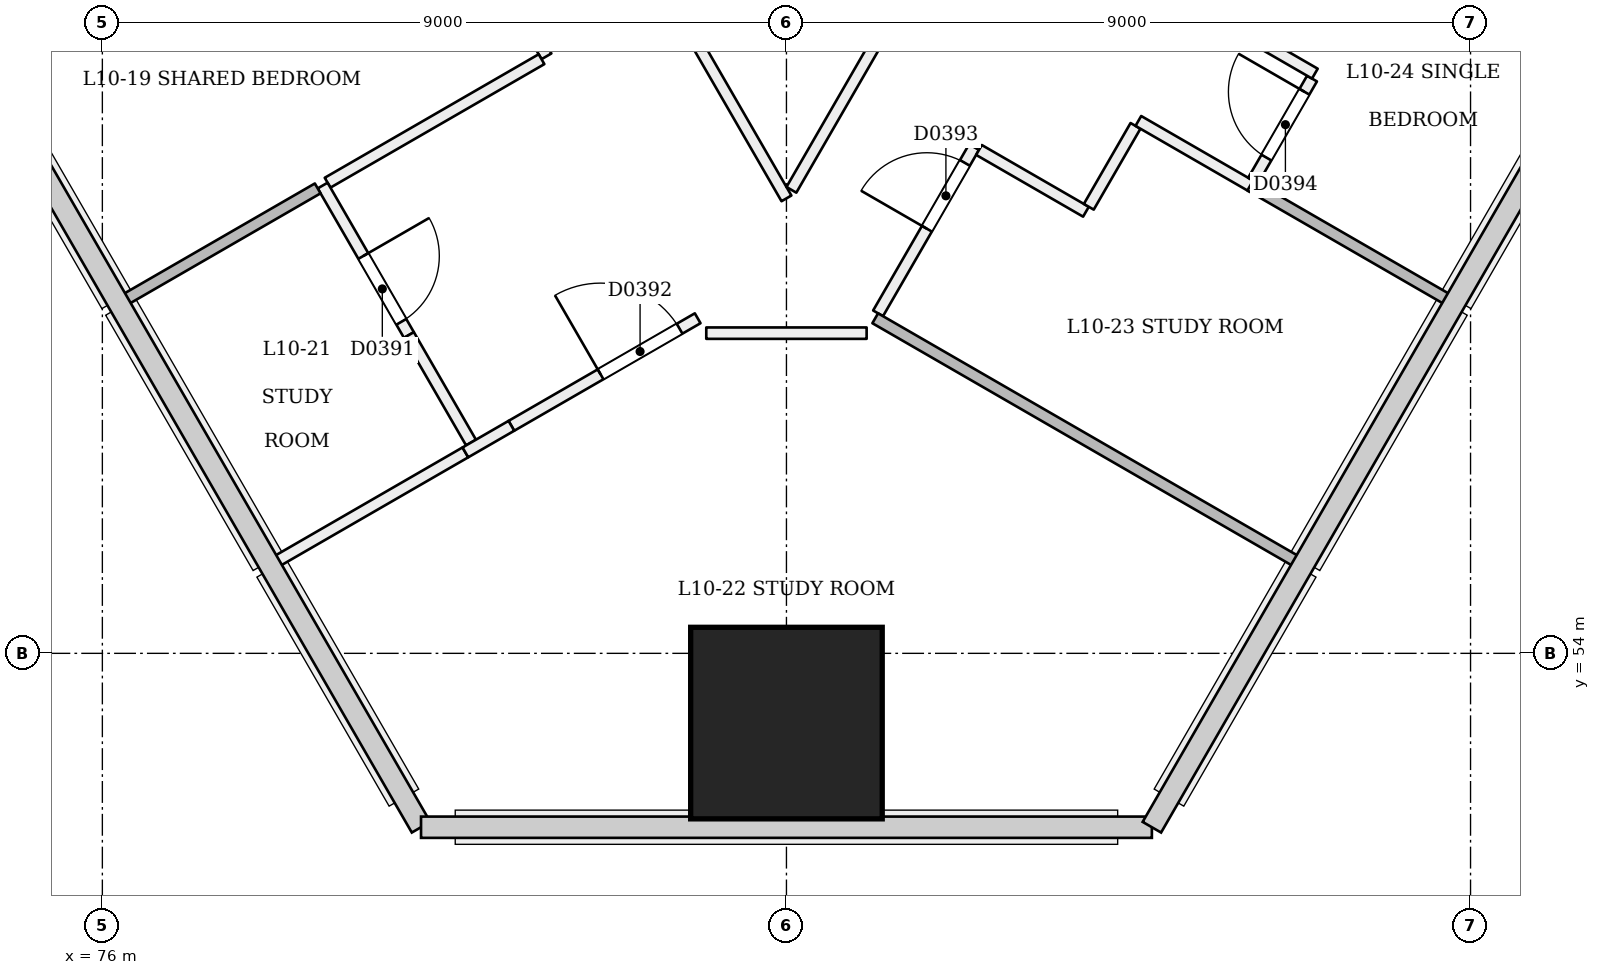
"""IFC4 building model, lengths in metres.
Left out: names, types, materials, properties, quantities, classifications, styles, units other than length and angle.
Written with IfcOpenShell. Run it as: python <this file> out.ifc"""

import sys

from ifc_helpers import new_model, si_unit, direction, frame, frame_2d, origin, origin_2d, place, context, subcontext, project, spatial, rectangle, extrude, element, fill, save


model = new_model("IFC4")
c1 = context("Model", 3, precision=1e-05, world=origin(), true_north=direction((0.0, 1.0)))
c2 = subcontext(c1, "Body", "Model", "MODEL_VIEW")
j1 = project(units=[si_unit("LENGTHUNIT", "METRE"), si_unit("PLANEANGLEUNIT", "RADIAN")], contexts=[c1])
p1 = place(None, origin())
s1 = spatial("IfcSite", under=j1, at=p1, CompositionType="ELEMENT")
p2 = place(p1, origin())
s2 = spatial("IfcBuilding", under=s1, at=p2, CompositionType="ELEMENT")
p3 = place(p2, frame((0.0, 0.0, 45.0)))
s3 = spatial("IfcBuildingStorey", under=s2, at=p3, CompositionType="ELEMENT", Elevation=45.0)
p4 = place(p3, frame((85.0, 53.012, 0.0), z_axis=(0.0, 0.058356907999, 0.998295783467), x_axis=(-1.0, 0.0, 0.0)))
e1 = element("IfcColumn", 1, at=p4, inside=s3, PredefinedType="COLUMN", context=c2, shape_type="SweptSolid", body=[
    extrude(rectangle(XDim=2.52, YDim=2.52, at=origin_2d()), origin(), (0.0, 0.0, 1.0), 3.606),
])
p5 = place(p3, frame((61.853, 96.477, 0.0), z_axis=(0.0, 0.0, 1.0), x_axis=(0.500000327816, -0.86602521452, 0.0)))
e2 = element("IfcWall", 2, at=p5, inside=s3, PredefinedType="PARTITIONING", context=c2, shape_type="SweptSolid", body=[
    extrude(rectangle(XDim=39.979, YDim=0.15, at=frame_2d((19.99, 0.0))), origin(), (0.0, 0.0, 1.0), 2.7),
])
p6 = place(p5, frame((1.49, 0.0, 0.0)))
e3 = element("IfcOpeningElement", 3, at=p6, cuts=e2, PredefinedType="OPENING", context=c2, shape_type="SweptSolid", body=[
    extrude(rectangle(XDim=1.0, YDim=2.1, at=frame_2d((0.5, 1.05))), frame((0.0, 0.085, 0.0), z_axis=(0.0, -1.0, 0.0), x_axis=(1.0, 0.0, 0.0)), (0.0, 0.0, 1.0), 0.171),
])
p7 = place(p5, frame((4.55, 0.0, 0.0)))
e4 = element("IfcOpeningElement", 4, at=p7, cuts=e2, PredefinedType="OPENING", context=c2, shape_type="SweptSolid", body=[
    extrude(rectangle(XDim=1.1, YDim=2.1, at=frame_2d((0.55, 1.05))), frame((0.0, 0.085, 0.0), z_axis=(0.0, -1.0, 0.0), x_axis=(1.0, 0.0, 0.0)), (0.0, 0.0, 1.0), 0.171),
])
p8 = place(p5, frame((11.259, 0.0, 0.0)))
e5 = element("IfcOpeningElement", 5, at=p8, cuts=e2, PredefinedType="OPENING", context=c2, shape_type="SweptSolid", body=[
    extrude(rectangle(XDim=1.0, YDim=2.1, at=frame_2d((0.5, 1.05))), frame((0.0, 0.085, 0.0), z_axis=(0.0, -1.0, 0.0), x_axis=(1.0, 0.0, 0.0)), (0.0, 0.0, 1.0), 0.171),
])
p9 = place(p5, frame((17.979, 0.0, 0.0)))
e6 = element("IfcOpeningElement", 6, at=p9, cuts=e2, PredefinedType="OPENING", context=c2, shape_type="SweptSolid", body=[
    extrude(rectangle(XDim=1.2, YDim=2.1, at=frame_2d((0.6, 1.05))), frame((0.0, 0.085, 0.0), z_axis=(0.0, -1.0, 0.0), x_axis=(1.0, 0.0, 0.0)), (0.0, 0.0, 1.0), 0.171),
])
p10 = place(p5, frame((22.699, 0.0, 0.0)))
e7 = element("IfcOpeningElement", 7, at=p10, cuts=e2, PredefinedType="OPENING", context=c2, shape_type="SweptSolid", body=[
    extrude(rectangle(XDim=1.0, YDim=2.1, at=frame_2d((0.5, 1.05))), frame((0.0, 0.085, 0.0), z_axis=(0.0, -1.0, 0.0), x_axis=(1.0, 0.0, 0.0)), (0.0, 0.0, 1.0), 0.171),
])
p11 = place(p5, frame((29.374, 0.0, 0.0)))
e8 = element("IfcOpeningElement", 8, at=p11, cuts=e2, PredefinedType="OPENING", context=c2, shape_type="SweptSolid", body=[
    extrude(rectangle(XDim=1.0, YDim=2.1, at=frame_2d((0.5, 1.05))), frame((0.0, 0.085, 0.0), z_axis=(0.0, -1.0, 0.0), x_axis=(1.0, 0.0, 0.0)), (0.0, 0.0, 1.0), 0.171),
])
p12 = place(p5, frame((31.584, 0.0, 0.0)))
e9 = element("IfcOpeningElement", 9, at=p12, cuts=e2, PredefinedType="OPENING", context=c2, shape_type="SweptSolid", body=[
    extrude(rectangle(XDim=1.0, YDim=2.1, at=frame_2d((0.5, 1.05))), frame((0.0, 0.085, 0.0), z_axis=(0.0, -1.0, 0.0), x_axis=(1.0, 0.0, 0.0)), (0.0, 0.0, 1.0), 0.171),
])
p13 = place(p5, frame((38.374, 0.0, 0.0)))
e10 = element("IfcOpeningElement", 10, at=p13, cuts=e2, PredefinedType="OPENING", context=c2, shape_type="SweptSolid", body=[
    extrude(rectangle(XDim=1.0, YDim=2.1, at=frame_2d((0.5, 1.05))), frame((0.0, 0.085, 0.0), z_axis=(0.0, -1.0, 0.0), x_axis=(1.0, 0.0, 0.0)), (0.0, 0.0, 1.0), 0.171),
])
p14 = place(p3, frame((81.778, 61.817, 0.0), z_axis=(0.0, 0.0, 1.0), x_axis=(-0.866015446554, -0.500017246033, 0.0)))
e11 = element("IfcWall", 11, at=p14, inside=s3, PredefinedType="PARTITIONING", context=c2, shape_type="SweptSolid", body=[
    extrude(rectangle(XDim=3.25, YDim=0.15, at=frame_2d((1.625, 0.0))), origin(), (0.0, 0.0, 1.0), 3.1),
])
p15 = place(p3, frame((78.898, 60.154, 0.0), z_axis=(0.0, 0.0, 1.0), x_axis=(0.499921036309, -0.866070988693, 0.0)))
e12 = element("IfcWall", 12, at=p15, inside=s3, PredefinedType="PARTITIONING", context=c2, shape_type="SweptSolid", body=[
    extrude(rectangle(XDim=2.27, YDim=0.15, at=frame_2d((1.135, 0.0))), origin(), (0.0, 0.0, 1.0), 3.1),
])
p16 = place(p15, frame((1.07, 0.0, 0.0)))
e13 = element("IfcOpeningElement", 13, at=p16, cuts=e12, PredefinedType="OPENING", context=c2, shape_type="SweptSolid", body=[
    extrude(rectangle(XDim=1.0, YDim=2.1, at=frame_2d((0.5, 1.05))), frame((0.0, 0.085, 0.0), z_axis=(0.0, -1.0, 0.0), x_axis=(1.0, 0.0, 0.0)), (0.0, 0.0, 1.0), 0.171),
])
p17 = place(p3, frame((80.033, 58.188, 0.0), z_axis=(0.0, 0.0, 1.0), x_axis=(0.500093320734, -0.865971518329, 0.0)))
e14 = element("IfcWall", 14, at=p17, inside=s3, PredefinedType="PARTITIONING", context=c2, shape_type="SweptSolid", body=[
    extrude(rectangle(XDim=1.634, YDim=0.15, at=frame_2d((0.817, 0.0))), origin(), (0.0, 0.0, 1.0), 2.6),
])
p18 = place(p3, frame((81.381, 56.993, 0.0), z_axis=(0.0, 0.0, 1.0), x_axis=(0.866004557827, 0.500036104519, 0.0)))
e15 = element("IfcWall", 15, at=p18, inside=s3, PredefinedType="PARTITIONING", context=c2, shape_type="SweptSolid", body=[
    extrude(rectangle(XDim=2.83, YDim=0.15, at=frame_2d((1.415, 0.0))), origin(), (0.0, 0.0, 1.0), 3.1),
])
p19 = place(p18, frame((1.355, 0.0, 0.0)))
e16 = element("IfcOpeningElement", 16, at=p19, cuts=e15, PredefinedType="OPENING", context=c2, shape_type="SweptSolid", body=[
    extrude(rectangle(XDim=1.2, YDim=2.1, at=frame_2d((0.6, 1.05))), frame((0.0, 0.085, 0.0), z_axis=(0.0, -1.0, 0.0), x_axis=(1.0, 0.0, 0.0)), (0.0, 0.0, 1.0), 0.171),
])
p20 = place(p3, frame((83.945, 58.212, 0.0), z_axis=(0.0, 0.0, 1.0), x_axis=(1.0, 0.0, 0.0)))
e17 = element("IfcWall", 17, at=p20, inside=s3, PredefinedType="PARTITIONING", context=c2, shape_type="SweptSolid", body=[
    extrude(rectangle(XDim=2.109, YDim=0.15, at=frame_2d((1.055, 0.0))), origin(), (0.0, 0.0, 1.0), 3.1),
])
p21 = place(p3, frame((86.205, 58.473, 0.0), z_axis=(0.0, 0.0, 1.0), x_axis=(0.500090717682, 0.865973021571, 0.0)))
e18 = element("IfcWall", 18, at=p21, inside=s3, PredefinedType="PARTITIONING", context=c2, shape_type="SweptSolid", body=[
    extrude(rectangle(XDim=2.525, YDim=0.15, at=frame_2d((1.262, 0.0))), origin(), (0.0, 0.0, 1.0), 3.1),
])
p22 = place(p21, frame((1.285, 0.0, 0.0)))
e19 = element("IfcOpeningElement", 19, at=p22, cuts=e18, PredefinedType="OPENING", context=c2, shape_type="SweptSolid", body=[
    extrude(rectangle(XDim=1.0, YDim=2.1, at=frame_2d((0.5, 1.05))), frame((0.0, 0.085, 0.0), z_axis=(0.0, -1.0, 0.0), x_axis=(1.0, 0.0, 0.0)), (0.0, 0.0, 1.0), 0.171),
])
p23 = place(p3, frame((87.533, 60.623, 0.0), z_axis=(0.0, 0.0, 1.0), x_axis=(0.866015446554, -0.500017246033, 0.0)))
e20 = element("IfcWall", 20, at=p23, inside=s3, PredefinedType="PARTITIONING", context=c2, shape_type="SweptSolid", body=[
    extrude(rectangle(XDim=1.625, YDim=0.15, at=frame_2d((0.812, 0.0))), origin(), (0.0, 0.0, 1.0), 3.1),
])
p24 = place(p3, frame((88.978, 59.875, 0.0), z_axis=(0.0, 0.0, 1.0), x_axis=(0.500049196018, 0.865996998587, 0.0)))
e21 = element("IfcWall", 21, at=p24, inside=s3, PredefinedType="PARTITIONING", context=c2, shape_type="SweptSolid", body=[
    extrude(rectangle(XDim=1.229, YDim=0.15, at=frame_2d((0.615, 0.0))), origin(), (0.0, 0.0, 1.0), 3.1),
])
p25 = place(p3, frame((89.63, 61.004, 0.0), z_axis=(0.0, 0.0, 1.0), x_axis=(0.866050849587, -0.499955923987, 0.0)))
e22 = element("IfcWall", 22, at=p25, inside=s3, PredefinedType="PARTITIONING", context=c2, shape_type="SweptSolid", body=[
    extrude(rectangle(XDim=1.72, YDim=0.15, at=frame_2d((0.86, 0.0))), origin(), (0.0, 0.0, 1.0), 3.1),
])
p26 = place(p3, frame((91.139, 60.219, 0.0), z_axis=(0.0, 0.0, 1.0), x_axis=(0.499967891604, 0.866043940782, 0.0)))
e23 = element("IfcWall", 23, at=p26, inside=s3, PredefinedType="PARTITIONING", context=c2, shape_type="SweptSolid", body=[
    extrude(rectangle(XDim=1.55, YDim=0.15, at=frame_2d((0.775, 0.0))), origin(), (0.0, 0.0, 1.0), 3.1),
])
p27 = place(p26, frame((0.35, 0.0, 0.0)))
e24 = element("IfcOpeningElement", 24, at=p27, cuts=e23, PredefinedType="OPENING", context=c2, shape_type="SweptSolid", body=[
    extrude(rectangle(XDim=1.0, YDim=2.1, at=frame_2d((0.5, 1.05))), frame((0.0, 0.085, 0.0), z_axis=(0.0, -1.0, 0.0), x_axis=(1.0, 0.0, 0.0)), (0.0, 0.0, 1.0), 0.171),
])
p28 = place(p3, frame((91.952, 61.626, 0.0), z_axis=(0.0, 0.0, 1.0), x_axis=(-0.865989465428, 0.500062241894, 0.0)))
e25 = element("IfcWall", 25, at=p28, inside=s3, PredefinedType="PARTITIONING", context=c2, shape_type="SweptSolid", body=[
    extrude(rectangle(XDim=1.7, YDim=0.15, at=frame_2d((0.85, 0.0))), origin(), (0.0, 0.0, 1.0), 3.1),
])
p29 = place(p3, frame((85.0, 59.985, 0.0), z_axis=(0.0, 0.0, 1.0), x_axis=(-0.499997052475, 0.866027105532, 0.0)))
e26 = element("IfcWall", 26, at=p29, inside=s3, PredefinedType="PARTITIONING", context=c2, shape_type="SweptSolid", body=[
    extrude(rectangle(XDim=35.351, YDim=0.15, at=frame_2d((17.675, 0.0))), origin(), (0.0, 0.0, 1.0), 3.1),
])
p30 = place(p29, frame((18.895, 0.0, 0.0)))
e27 = element("IfcOpeningElement", 27, at=p30, cuts=e26, PredefinedType="OPENING", context=c2, shape_type="SweptSolid", body=[
    extrude(rectangle(XDim=1.2, YDim=2.1, at=frame_2d((0.6, 1.05))), frame((0.0, 0.085, 0.0), z_axis=(0.0, -1.0, 0.0), x_axis=(1.0, 0.0, 0.0)), (0.0, 0.0, 1.0), 0.171),
])
p31 = place(p29, frame((24.135, 0.0, 0.0)))
e28 = element("IfcOpeningElement", 28, at=p31, cuts=e26, PredefinedType="OPENING", context=c2, shape_type="SweptSolid", body=[
    extrude(rectangle(XDim=1.2, YDim=2.1, at=frame_2d((0.6, 1.05))), frame((0.0, 0.085, 0.0), z_axis=(0.0, -1.0, 0.0), x_axis=(1.0, 0.0, 0.0)), (0.0, 0.0, 1.0), 0.171),
])
p32 = place(p29, frame((14.175, 0.0, 0.0)))
e29 = element("IfcOpeningElement", 29, at=p32, cuts=e26, PredefinedType="OPENING", context=c2, shape_type="SweptSolid", body=[
    extrude(rectangle(XDim=1.2, YDim=2.1, at=frame_2d((0.6, 1.05))), frame((0.0, 0.085, 0.0), z_axis=(0.0, -1.0, 0.0), x_axis=(1.0, 0.0, 0.0)), (0.0, 0.0, 1.0), 0.171),
])
p33 = place(p29, frame((31.812, 0.0, 0.0)))
e30 = element("IfcOpeningElement", 30, at=p33, cuts=e26, PredefinedType="OPENING", context=c2, shape_type="SweptSolid", body=[
    extrude(rectangle(XDim=1.2, YDim=2.1, at=frame_2d((0.6, 1.05))), frame((0.0, 0.085, 0.0), z_axis=(0.0, -1.0, 0.0), x_axis=(1.0, 0.0, 0.0)), (0.0, 0.0, 1.0), 0.171),
])
p34 = place(p29, frame((8.541, 0.0, 0.0)))
e31 = element("IfcOpeningElement", 31, at=p34, cuts=e26, PredefinedType="OPENING", context=c2, shape_type="SweptSolid", body=[
    extrude(rectangle(XDim=1.2, YDim=2.1, at=frame_2d((0.6, 1.05))), frame((0.0, 0.085, 0.0), z_axis=(0.0, -1.0, 0.0), x_axis=(1.0, 0.0, 0.0)), (0.0, 0.0, 1.0), 0.171),
])
p35 = place(p29, frame((28.206, 0.0, 0.0)))
e32 = element("IfcOpeningElement", 32, at=p35, cuts=e26, PredefinedType="OPENING", context=c2, shape_type="SweptSolid", body=[
    extrude(rectangle(XDim=1.0, YDim=2.1, at=frame_2d((0.5, 1.05))), frame((0.0, 0.085, 0.0), z_axis=(0.0, -1.0, 0.0), x_axis=(1.0, 0.0, 0.0)), (0.0, 0.0, 1.0), 0.171),
])
p36 = place(p29, frame((3.634, 0.0, 0.0)))
e33 = element("IfcOpeningElement", 33, at=p36, cuts=e26, PredefinedType="OPENING", context=c2, shape_type="SweptSolid", body=[
    extrude(rectangle(XDim=1.0, YDim=2.1, at=frame_2d((0.5, 1.05))), frame((0.0, 0.085, 0.0), z_axis=(0.0, -1.0, 0.0), x_axis=(1.0, 0.0, 0.0)), (0.0, 0.0, 1.0), 0.171),
])
p37 = place(p3, frame((102.675, 90.6, 0.0), z_axis=(0.0, 0.0, 1.0), x_axis=(-0.499997865474, -0.86602663615, 0.0)))
e34 = element("IfcWall", 34, at=p37, inside=s3, PredefinedType="PARTITIONING", context=c2, shape_type="SweptSolid", body=[
    extrude(rectangle(XDim=35.221, YDim=0.15, at=frame_2d((17.61, 0.0))), origin(), (0.0, 0.0, 1.0), 3.1),
])
p38 = place(p37, frame((12.875, 0.0, 0.0)))
e35 = element("IfcOpeningElement", 35, at=p38, cuts=e34, PredefinedType="OPENING", context=c2, shape_type="SweptSolid", body=[
    extrude(rectangle(XDim=1.2, YDim=2.1, at=frame_2d((0.6, 1.05))), frame((0.0, 0.085, 0.0), z_axis=(0.0, -1.0, 0.0), x_axis=(1.0, 0.0, 0.0)), (0.0, 0.0, 1.0), 0.171),
])
p39 = place(p37, frame((4.983, 0.0, 0.0)))
e36 = element("IfcOpeningElement", 36, at=p39, cuts=e34, PredefinedType="OPENING", context=c2, shape_type="SweptSolid", body=[
    extrude(rectangle(XDim=1.2, YDim=2.1, at=frame_2d((0.6, 1.05))), frame((0.0, 0.085, 0.0), z_axis=(0.0, -1.0, 0.0), x_axis=(1.0, 0.0, 0.0)), (0.0, 0.0, 1.0), 0.171),
])
p40 = place(p37, frame((21.048, 0.0, 0.0)))
e37 = element("IfcOpeningElement", 37, at=p40, cuts=e34, PredefinedType="OPENING", context=c2, shape_type="SweptSolid", body=[
    extrude(rectangle(XDim=1.0, YDim=2.1, at=frame_2d((0.5, 1.05))), frame((0.0, 0.085, 0.0), z_axis=(0.0, -1.0, 0.0), x_axis=(1.0, 0.0, 0.0)), (0.0, 0.0, 1.0), 0.171),
])
p41 = place(p3, frame((76.282, 58.644, 0.0), z_axis=(0.0, 0.0, 1.0), x_axis=(0.866066880077, 0.499928154072, 0.0)))
e38 = element("IfcWall", 38, at=p41, inside=s3, PredefinedType="PARTITIONING", context=c2, shape_type="SweptSolid", body=[
    extrude(rectangle(XDim=2.945, YDim=0.15, at=frame_2d((1.473, 0.0))), origin(), (0.0, 0.0, 1.0), 2.6),
])
p42 = place(p3, frame((78.272, 55.198, 0.0), z_axis=(0.0, 0.0, 1.0), x_axis=(0.866021079084, 0.500007490527, 0.0)))
e39 = element("IfcWall", 39, at=p42, inside=s3, PredefinedType="PARTITIONING", context=c2, shape_type="SweptSolid", body=[
    extrude(rectangle(XDim=2.892, YDim=0.15, at=frame_2d((1.446, 0.0))), origin(), (0.0, 0.0, 1.0), 3.1),
])
p43 = place(p3, frame((80.776, 56.644, 0.0), z_axis=(0.0, 0.0, 1.0), x_axis=(0.86606341989, 0.499934148392, 0.0)))
e40 = element("IfcWall", 40, at=p43, inside=s3, PredefinedType="PARTITIONING", context=c2, shape_type="SweptSolid", body=[
    extrude(rectangle(XDim=0.699, YDim=0.15, at=frame_2d((0.349, 0.0))), origin(), (0.0, 0.0, 1.0), 2.6),
])
p44 = place(p3, frame((91.728, 55.198, 0.0), z_axis=(0.0, 0.0, 1.0), x_axis=(-0.866018406147, 0.500012120068, 0.0)))
e41 = element("IfcWall", 41, at=p44, inside=s3, PredefinedType="PARTITIONING", context=c2, shape_type="SweptSolid", body=[
    extrude(rectangle(XDim=6.42, YDim=0.15, at=frame_2d((3.21, 0.0))), origin(), (0.0, 0.0, 1.0), 2.6),
])
p45 = place(p3, frame((93.718, 58.644, 0.0), z_axis=(0.0, 0.0, 1.0), x_axis=(-0.866050981532, 0.499955695424, 0.0)))
e42 = element("IfcWall", 42, at=p45, inside=s3, PredefinedType="PARTITIONING", context=c2, shape_type="SweptSolid", body=[
    extrude(rectangle(XDim=3.02, YDim=0.15, at=frame_2d((1.51, 0.0))), origin(), (0.0, 0.0, 1.0), 2.6),
])
p46 = place(p16, origin())
e43 = element("IfcDoor", 43, at=p46, inside=s3, OperationType="SINGLE_SWING_LEFT", PredefinedType="NOTDEFINED", context=c2, shape_type="SweptSolid", body=[
    extrude(rectangle(XDim=1.0, YDim=2.1, at=frame_2d((0.5, 1.05))), frame((0.0, 0.025, 0.0), z_axis=(0.0, -1.0, 0.0), x_axis=(1.0, 0.0, 0.0)), (0.0, 0.0, 1.0), 0.05),
])
fill(e13, e43)
p47 = place(p19, origin())
e44 = element("IfcDoor", 44, at=p47, inside=s3, OperationType="SINGLE_SWING_LEFT", PredefinedType="NOTDEFINED", context=c2, shape_type="SweptSolid", body=[
    extrude(rectangle(XDim=1.2, YDim=2.1, at=frame_2d((0.6, 1.05))), frame((0.0, 0.025, 0.0), z_axis=(0.0, -1.0, 0.0), x_axis=(1.0, 0.0, 0.0)), (0.0, 0.0, 1.0), 0.05),
])
fill(e16, e44)
p48 = place(p22, origin())
e45 = element("IfcDoor", 45, at=p48, inside=s3, OperationType="SINGLE_SWING_LEFT", PredefinedType="NOTDEFINED", context=c2, shape_type="SweptSolid", body=[
    extrude(rectangle(XDim=1.0, YDim=2.1, at=frame_2d((0.5, 1.05))), frame((0.0, 0.025, 0.0), z_axis=(0.0, -1.0, 0.0), x_axis=(1.0, 0.0, 0.0)), (0.0, 0.0, 1.0), 0.05),
])
fill(e19, e45)
p49 = place(p27, origin())
e46 = element("IfcDoor", 46, at=p49, inside=s3, OperationType="SINGLE_SWING_RIGHT", PredefinedType="NOTDEFINED", context=c2, shape_type="SweptSolid", body=[
    extrude(rectangle(XDim=1.0, YDim=2.1, at=frame_2d((0.5, 1.05))), frame((0.0, 0.025, 0.0), z_axis=(0.0, -1.0, 0.0), x_axis=(1.0, 0.0, 0.0)), (0.0, 0.0, 1.0), 0.05),
])
fill(e24, e46)
save(model, sys.argv[1])
